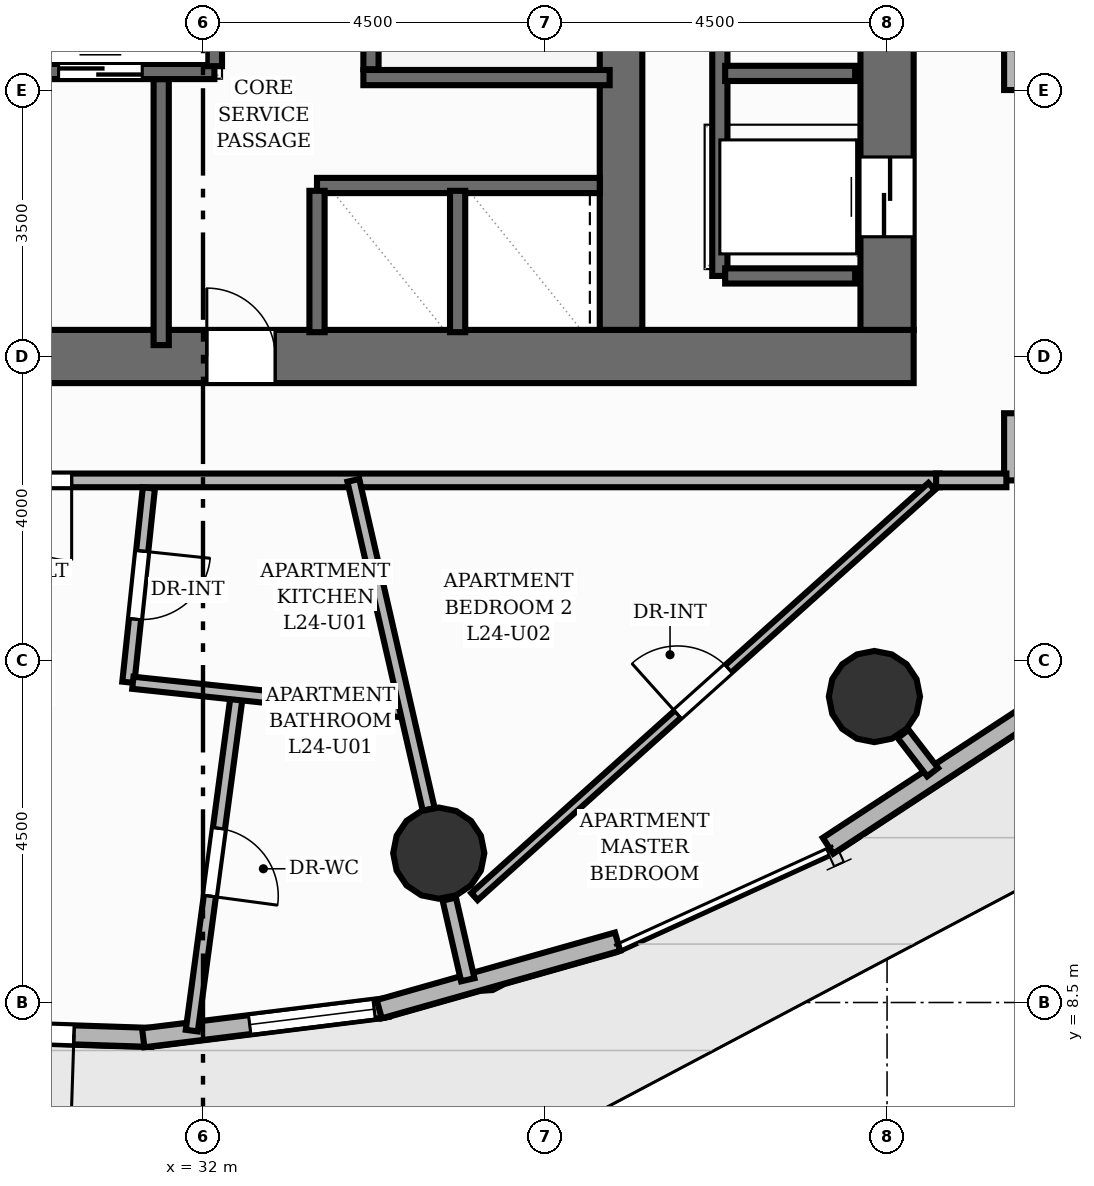
"""IFC4 building model, lengths in metres.
Left out: names, types, materials, properties, quantities, classifications, styles, units other than length and angle.
Written with IfcOpenShell. Run it as: python <this file> out.ifc"""

import sys

from ifc_helpers import new_model, si_unit, direction, frame, frame_2d, origin, origin_2d, place, context, subcontext, project, spatial, rectangle, circle, extrude, element, fill, save


model = new_model("IFC4")
c1 = context("Model", 3, precision=1e-05, world=origin(), true_north=direction((0.0, 1.0)))
c2 = subcontext(c1, "Body", "Model", "MODEL_VIEW")
j1 = project(units=[si_unit("LENGTHUNIT", "METRE"), si_unit("PLANEANGLEUNIT", "RADIAN")], contexts=[c1])
p1 = place(None, origin())
s1 = spatial("IfcSite", under=j1, at=p1, CompositionType="ELEMENT")
p2 = place(p1, origin())
s2 = spatial("IfcBuilding", under=s1, at=p2, CompositionType="ELEMENT")
p3 = place(p2, frame((0.0, 0.0, 83.68)))
s3 = spatial("IfcBuildingStorey", under=s2, at=p3, CompositionType="ELEMENT", Elevation=83.68)
p4 = place(p3, frame((22.65, 17.0, 0.0), z_axis=(0.0, 0.0, 1.0), x_axis=(1.0, 0.0, 0.0)))
e1 = element("IfcWall", 1, at=p4, inside=s3, PredefinedType="SHEAR", context=c2, shape_type="SweptSolid", body=[
    extrude(rectangle(XDim=18.7, YDim=0.7, at=frame_2d((9.35, 0.0))), origin(), (0.0, 0.0, 1.0), 3.2),
])
p5 = place(p4, frame((5.85, 0.0, 0.0)))
e2 = element("IfcOpeningElement", 2, at=p5, cuts=e1, PredefinedType="OPENING", context=c2, shape_type="SweptSolid", body=[
    extrude(rectangle(XDim=1.1, YDim=2.15, at=frame_2d((0.55, 1.075))), frame((0.0, 0.36, 0.0), z_axis=(0.0, -1.0, 0.0), x_axis=(1.0, 0.0, 0.0)), (0.0, 0.0, 1.0), 0.72),
])
p6 = place(p4, frame((9.4, 0.0, 0.0)))
e3 = element("IfcOpeningElement", 3, at=p6, cuts=e1, PredefinedType="OPENING", context=c2, shape_type="SweptSolid", body=[
    extrude(rectangle(XDim=0.9, YDim=2.1, at=frame_2d((0.45, 1.05))), frame((0.0, 0.36, 0.0), z_axis=(0.0, -1.0, 0.0), x_axis=(1.0, 0.0, 0.0)), (0.0, 0.0, 1.0), 0.72),
])
p7 = place(p3, frame((41.0, 17.35, 0.0), z_axis=(0.0, 0.0, 1.0), x_axis=(0.0, 1.0, 0.0)))
e4 = element("IfcWall", 4, at=p7, inside=s3, PredefinedType="SHEAR", context=c2, shape_type="SweptSolid", body=[
    extrude(rectangle(XDim=13.3, YDim=0.7, at=frame_2d((6.65, 0.0))), origin(), (0.0, 0.0, 1.0), 3.2),
])
p8 = place(p7, frame((1.225, 0.0, 0.0)))
e5 = element("IfcOpeningElement", 5, at=p8, cuts=e4, PredefinedType="OPENING", context=c2, shape_type="SweptSolid", body=[
    extrude(rectangle(XDim=1.05, YDim=2.15, at=frame_2d((0.525, 1.075))), frame((0.0, 0.36, 0.0), z_axis=(0.0, -1.0, 0.0), x_axis=(1.0, 0.0, 0.0)), (0.0, 0.0, 1.0), 0.72),
])
p9 = place(p7, frame((4.475, 0.0, 0.0)))
e6 = element("IfcOpeningElement", 6, at=p9, cuts=e4, PredefinedType="OPENING", context=c2, shape_type="SweptSolid", body=[
    extrude(rectangle(XDim=1.05, YDim=2.15, at=frame_2d((0.525, 1.075))), frame((0.0, 0.36, 0.0), z_axis=(0.0, -1.0, 0.0), x_axis=(1.0, 0.0, 0.0)), (0.0, 0.0, 1.0), 0.72),
])
p10 = place(p7, frame((7.775, 0.0, 0.0)))
e7 = element("IfcOpeningElement", 7, at=p10, cuts=e4, PredefinedType="OPENING", context=c2, shape_type="SweptSolid", body=[
    extrude(rectangle(XDim=1.05, YDim=2.15, at=frame_2d((0.525, 1.075))), frame((0.0, 0.36, 0.0), z_axis=(0.0, -1.0, 0.0), x_axis=(1.0, 0.0, 0.0)), (0.0, 0.0, 1.0), 0.72),
])
p11 = place(p7, frame((11.025, 0.0, 0.0)))
e8 = element("IfcOpeningElement", 8, at=p11, cuts=e4, PredefinedType="OPENING", context=c2, shape_type="SweptSolid", body=[
    extrude(rectangle(XDim=1.05, YDim=2.15, at=frame_2d((0.525, 1.075))), frame((0.0, 0.36, 0.0), z_axis=(0.0, -1.0, 0.0), x_axis=(1.0, 0.0, 0.0)), (0.0, 0.0, 1.0), 0.72),
])
p12 = place(p3, frame((37.5, 17.35, 0.0), z_axis=(0.0, 0.0, 1.0), x_axis=(0.0, 1.0, 0.0)))
e9 = element("IfcWall", 9, at=p12, inside=s3, PredefinedType="SHEAR", context=c2, shape_type="SweptSolid", body=[
    extrude(rectangle(XDim=13.3, YDim=0.56, at=frame_2d((6.65, 0.0))), origin(), (0.0, 0.0, 1.0), 3.2),
])
for number, where, z_axis, x_axis in (
    (10, (35.102, 10.465, 0.0), (0.0, 0.0, 1.0), (1.0, 0.0, 0.0)),
    (11, (40.833, 12.526, 0.0), (0.0, 0.0, 1.0), (1.0, 0.0, 0.0)),
):
    element("IfcColumn", number, at=place(p3, frame(where, z_axis=z_axis, x_axis=x_axis)), inside=s3, PredefinedType="COLUMN", context=c2, shape_type="SweptSolid", body=[
        extrude(circle(Radius=0.6, at=origin_2d()), origin(), (0.0, 0.0, 1.0), 3.2),
    ])
p13 = place(p3, frame((31.323, 8.041, 0.0), z_axis=(0.0, 0.0, 1.0), x_axis=(-0.999464092211, 0.032734208101, 0.0)))
e12 = element("IfcWall", 12, at=p13, inside=s3, PredefinedType="SOLIDWALL", context=c2, shape_type="SweptSolid", body=[
    extrude(rectangle(XDim=3.192, YDim=0.25, at=frame_2d((1.596, 0.0))), origin(), (0.0, 0.0, 1.0), 2.96),
])
p14 = place(p13, frame((1.021, 0.0, 0.0)))
e13 = element("IfcOpeningElement", 13, at=p14, cuts=e12, PredefinedType="OPENING", context=c2, shape_type="SweptSolid", body=[
    extrude(rectangle(XDim=1.15, YDim=2.2, at=frame_2d((0.575, 1.1))), frame((0.0, 0.135, 0.0), z_axis=(0.0, -1.0, 0.0), x_axis=(1.0, 0.0, 0.0)), (0.0, 0.0, 1.0), 0.27),
])
p15 = place(p3, frame((34.425, 8.434, 0.0), z_axis=(0.0, 0.0, 1.0), x_axis=(-0.99241077266, -0.122966899235, 0.0)))
e14 = element("IfcWall", 14, at=p15, inside=s3, PredefinedType="SOLIDWALL", context=c2, shape_type="SweptSolid", body=[
    extrude(rectangle(XDim=3.236, YDim=0.25, at=frame_2d((1.618, 0.0))), origin(), (0.0, 0.0, 1.0), 2.96),
])
p16 = place(p15, frame((0.175, 0.0, 0.85)))
e15 = element("IfcOpeningElement", 15, at=p16, cuts=e14, PredefinedType="OPENING", context=c2, shape_type="SweptSolid", body=[
    extrude(rectangle(XDim=1.65, YDim=1.55, at=frame_2d((0.825, 0.775))), frame((0.0, 0.135, 0.0), z_axis=(0.0, -1.0, 0.0), x_axis=(1.0, 0.0, 0.0)), (0.0, 0.0, 1.0), 0.27),
])
p17 = place(p3, frame((37.455, 9.301, 0.0), z_axis=(0.0, 0.0, 1.0), x_axis=(-0.962134911526, -0.272573681825, 0.0)))
e16 = element("IfcWall", 16, at=p17, inside=s3, PredefinedType="SOLIDWALL", context=c2, shape_type="SweptSolid", body=[
    extrude(rectangle(XDim=3.26, YDim=0.25, at=frame_2d((1.63, 0.0))), origin(), (0.0, 0.0, 1.0), 2.96),
])
p18 = place(p3, frame((42.929, 12.337, 0.0), z_axis=(0.0, 0.0, 1.0), x_axis=(-0.836273856728, -0.548311988336, 0.0)))
e17 = element("IfcWall", 17, at=p18, inside=s3, PredefinedType="SOLIDWALL", context=c2, shape_type="SweptSolid", body=[
    extrude(rectangle(XDim=3.236, YDim=0.25, at=frame_2d((1.618, 0.0))), origin(), (0.0, 0.0, 1.0), 2.96),
])
p19 = place(p3, frame((34.21, 20.78, 0.0), z_axis=(0.0, 0.0, 1.0), x_axis=(0.0, 1.0, 0.0)))
e18 = element("IfcWall", 18, at=p19, inside=s3, PredefinedType="SHEAR", context=c2, shape_type="SweptSolid", body=[
    extrude(rectangle(XDim=6.44, YDim=0.2, at=frame_2d((3.22, 0.0))), origin(), (0.0, 0.0, 1.0), 3.2),
])
p20 = place(p3, frame((34.11, 20.67, 0.0), z_axis=(0.0, 0.0, 1.0), x_axis=(1.0, 0.0, 0.0)))
e19 = element("IfcWall", 19, at=p20, inside=s3, PredefinedType="SHEAR", context=c2, shape_type="SweptSolid", body=[
    extrude(rectangle(XDim=3.24, YDim=0.2, at=frame_2d((1.62, 0.0))), origin(), (0.0, 0.0, 1.0), 3.2),
])
p21 = place(p3, frame((31.45, 17.15, 0.0), z_axis=(0.0, 0.0, 1.0), x_axis=(0.0, 1.0, 0.0)))
e20 = element("IfcWall", 20, at=p21, inside=s3, PredefinedType="SHEAR", context=c2, shape_type="SweptSolid", body=[
    extrude(rectangle(XDim=3.5, YDim=0.2, at=frame_2d((1.75, 0.0))), origin(), (0.0, 0.0, 1.0), 3.2),
])
p22 = place(p3, frame((29.85, 20.75, 0.0), z_axis=(0.0, 0.0, 1.0), x_axis=(1.0, 0.0, 0.0)))
e21 = element("IfcWall", 21, at=p22, inside=s3, PredefinedType="SHEAR", context=c2, shape_type="SweptSolid", body=[
    extrude(rectangle(XDim=2.3, YDim=0.2, at=frame_2d((1.15, 0.0))), origin(), (0.0, 0.0, 1.0), 3.2),
])
p23 = place(p22, frame((0.25, 0.0, 0.0)))
e22 = element("IfcOpeningElement", 22, at=p23, cuts=e21, PredefinedType="OPENING", context=c2, shape_type="SweptSolid", body=[
    extrude(rectangle(XDim=1.1, YDim=2.15, at=frame_2d((0.55, 1.075))), frame((0.0, 0.11, 0.0), z_axis=(0.0, -1.0, 0.0), x_axis=(1.0, 0.0, 0.0)), (0.0, 0.0, 1.0), 0.22),
])
p24 = place(p3, frame((32.15, 20.82, 0.0), z_axis=(0.0, 0.0, 1.0), x_axis=(0.0, 1.0, 0.0)))
e23 = element("IfcWall", 23, at=p24, inside=s3, PredefinedType="SHEAR", context=c2, shape_type="SweptSolid", body=[
    extrude(rectangle(XDim=1.71, YDim=0.2, at=frame_2d((0.855, 0.0))), origin(), (0.0, 0.0, 1.0), 3.2),
])
p25 = place(p3, frame((38.8, 18.06, 0.0), z_axis=(0.0, 0.0, 1.0), x_axis=(0.0, 1.0, 0.0)))
e24 = element("IfcWall", 24, at=p25, inside=s3, PredefinedType="SHEAR", context=c2, shape_type="SweptSolid", body=[
    extrude(rectangle(XDim=11.88, YDim=0.2, at=frame_2d((5.94, 0.0))), origin(), (0.0, 0.0, 1.0), 3.2),
])
for number, where, z_axis, x_axis in (
    (25, (38.87, 18.06, 0.0), (0.0, 0.0, 1.0), (1.0, 0.0, 0.0)),
    (26, (38.87, 20.725, 0.0), (0.0, 0.0, 1.0), (1.0, 0.0, 0.0)),
):
    element("IfcWall", number, at=place(p3, frame(where, z_axis=z_axis, x_axis=x_axis)), inside=s3, PredefinedType="SHEAR", context=c2, shape_type="SweptSolid", body=[
        extrude(rectangle(XDim=1.71, YDim=0.2, at=frame_2d((0.855, 0.0))), origin(), (0.0, 0.0, 1.0), 3.2),
    ])
p26 = place(p3, frame((33.5, 19.25, 0.0), z_axis=(0.0, 0.0, 1.0), x_axis=(1.0, 0.0, 0.0)))
e27 = element("IfcWall", 27, at=p26, inside=s3, PredefinedType="SHEAR", context=c2, shape_type="SweptSolid", body=[
    extrude(rectangle(XDim=3.72, YDim=0.2, at=frame_2d((1.86, 0.0))), origin(), (0.0, 0.0, 1.0), 3.2),
])
for number, where, z_axis, x_axis in (
    (28, (33.5, 17.32, 0.0), (0.0, 0.0, 1.0), (0.0, 1.0, 0.0)),
    (29, (35.35, 17.32, 0.0), (0.0, 0.0, 1.0), (0.0, 1.0, 0.0)),
):
    element("IfcWall", number, at=place(p3, frame(where, z_axis=z_axis, x_axis=x_axis)), inside=s3, PredefinedType="SHEAR", context=c2, shape_type="SweptSolid", body=[
        extrude(rectangle(XDim=1.86, YDim=0.2, at=frame_2d((0.93, 0.0))), origin(), (0.0, 0.0, 1.0), 3.2),
    ])
p27 = place(p3, frame((35.24, 9.861, 0.0), z_axis=(0.0, 0.0, 1.0), x_axis=(0.223287406217, -0.974752652843, 0.0)))
e30 = element("IfcWall", 30, at=p27, inside=s3, PredefinedType="PARTITIONING", context=c2, shape_type="SweptSolid", body=[
    extrude(rectangle(XDim=1.089, YDim=0.18, at=frame_2d((0.544, 0.0))), origin(), (0.0, 0.0, 1.0), 2.261),
])
p28 = place(p3, frame((41.212, 12.034, 0.0), z_axis=(0.0, 0.0, 1.0), x_axis=(0.609970610867, -0.792424036661, 0.0)))
e31 = element("IfcWall", 31, at=p28, inside=s3, PredefinedType="PARTITIONING", context=c2, shape_type="SweptSolid", body=[
    extrude(rectangle(XDim=0.635, YDim=0.18, at=frame_2d((0.318, 0.0))), origin(), (0.0, 0.0, 1.0), 2.261),
])
p29 = place(p3, frame((41.695, 15.37, 0.0), z_axis=(0.0, 0.0, 1.0), x_axis=(-1.0, 0.0, 0.0)))
e32 = element("IfcWall", 32, at=p29, inside=s3, PredefinedType="PARTITIONING", context=c2, shape_type="SweptSolid", body=[
    extrude(rectangle(XDim=20.325, YDim=0.18, at=frame_2d((10.163, 0.0))), origin(), (0.0, 0.0, 1.0), 2.955),
])
p30 = place(p29, frame((11.424, 0.0, 0.0)))
e33 = element("IfcOpeningElement", 33, at=p30, cuts=e32, PredefinedType="OPENING", context=c2, shape_type="SweptSolid", body=[
    extrude(rectangle(XDim=1.05, YDim=2.15, at=frame_2d((0.525, 1.075))), frame((0.0, 0.1, 0.0), z_axis=(0.0, -1.0, 0.0), x_axis=(1.0, 0.0, 0.0)), (0.0, 0.0, 1.0), 0.2),
])
p31 = place(p3, frame((42.63, 21.54, 0.0), z_axis=(0.0, 0.0, 1.0), x_axis=(0.0, -1.0, 0.0)))
e34 = element("IfcWall", 34, at=p31, inside=s3, PredefinedType="PARTITIONING", context=c2, shape_type="SweptSolid", body=[
    extrude(rectangle(XDim=1.034, YDim=0.18, at=frame_2d((0.517, 0.0))), origin(), (0.0, 0.0, 1.0), 2.955),
])
p32 = place(p3, frame((42.63, 16.253, 0.0), z_axis=(0.0, 0.0, 1.0), x_axis=(0.0, -1.0, 0.0)))
e35 = element("IfcWall", 35, at=p32, inside=s3, PredefinedType="PARTITIONING", context=c2, shape_type="SweptSolid", body=[
    extrude(rectangle(XDim=0.883, YDim=0.18, at=frame_2d((0.441, 0.0))), origin(), (0.0, 0.0, 1.0), 2.955),
])
p33 = place(p3, frame((42.57, 15.37, 0.0), z_axis=(0.0, 0.0, 1.0), x_axis=(-1.0, 0.0, 0.0)))
e36 = element("IfcWall", 36, at=p33, inside=s3, PredefinedType="PARTITIONING", context=c2, shape_type="SweptSolid", body=[
    extrude(rectangle(XDim=0.925, YDim=0.18, at=frame_2d((0.462, 0.0))), origin(), (0.0, 0.0, 1.0), 2.955),
])
p34 = place(p3, frame((32.448, 12.562, 0.0), z_axis=(0.0, 0.0, 1.0), x_axis=(-0.132986130607, -0.991117898671, 0.0)))
e37 = element("IfcWall", 37, at=p34, inside=s3, PredefinedType="PLUMBINGWALL", context=c2, shape_type="SweptSolid", body=[
    extrude(rectangle(XDim=4.472, YDim=0.16, at=frame_2d((2.236, 0.0))), origin(), (0.0, 0.0, 1.0), 2.955),
])
p35 = place(p34, frame((1.786, 0.0, 0.0)))
e38 = element("IfcOpeningElement", 38, at=p35, cuts=e37, PredefinedType="OPENING", context=c2, shape_type="SweptSolid", body=[
    extrude(rectangle(XDim=0.9, YDim=2.1, at=frame_2d((0.45, 1.05))), frame((0.0, 0.09, 0.0), z_axis=(0.0, -1.0, 0.0), x_axis=(1.0, 0.0, 0.0)), (0.0, 0.0, 1.0), 0.18),
])
p36 = place(p3, frame((31.288, 15.271, 0.0), z_axis=(0.0, 0.0, 1.0), x_axis=(-0.105094954285, -0.994462191631, 0.0)))
e39 = element("IfcWall", 39, at=p36, inside=s3, PredefinedType="PLUMBINGWALL", context=c2, shape_type="SweptSolid", body=[
    extrude(rectangle(XDim=2.572, YDim=0.16, at=frame_2d((1.286, 0.0))), origin(), (0.0, 0.0, 1.0), 2.641),
])
p37 = place(p36, frame((0.836, 0.0, 0.0)))
e40 = element("IfcOpeningElement", 40, at=p37, cuts=e39, PredefinedType="OPENING", context=c2, shape_type="SweptSolid", body=[
    extrude(rectangle(XDim=0.9, YDim=2.1, at=frame_2d((0.45, 1.05))), frame((0.0, 0.09, 0.0), z_axis=(0.0, -1.0, 0.0), x_axis=(1.0, 0.0, 0.0)), (0.0, 0.0, 1.0), 0.18),
])
p38 = place(p3, frame((31.077, 12.707, 0.0), z_axis=(0.0, 0.0, 1.0), x_axis=(0.994472124215, -0.105000924563, 0.0)))
e41 = element("IfcWall", 41, at=p38, inside=s3, PredefinedType="PLUMBINGWALL", context=c2, shape_type="SweptSolid", body=[
    extrude(rectangle(XDim=3.618, YDim=0.16, at=frame_2d((1.809, 0.0))), origin(), (0.0, 0.0, 1.0), 2.955),
])
p39 = place(p3, frame((33.978, 15.37, 0.0), z_axis=(0.0, 0.0, 1.0), x_axis=(0.223321757884, -0.974744783241, 0.0)))
e42 = element("IfcWall", 42, at=p39, inside=s3, PredefinedType="PLUMBINGWALL", context=c2, shape_type="SweptSolid", body=[
    extrude(rectangle(XDim=4.442, YDim=0.16, at=frame_2d((2.221, 0.0))), origin(), (0.0, 0.0, 1.0), 2.261),
])
p40 = place(p3, frame((35.571, 9.894, 0.0), z_axis=(0.0, 0.0, 1.0), x_axis=(0.744379363772, 0.667756963865, 0.0)))
e43 = element("IfcWall", 43, at=p40, inside=s3, PredefinedType="PARTITIONING", context=c2, shape_type="SweptSolid", body=[
    extrude(rectangle(XDim=8.08, YDim=0.125, at=frame_2d((4.04, 0.0))), origin(), (0.0, 0.0, 1.0), 2.404),
])
p41 = place(p40, frame((3.59, 0.0, 0.0)))
e44 = element("IfcOpeningElement", 44, at=p41, cuts=e43, PredefinedType="OPENING", context=c2, shape_type="SweptSolid", body=[
    extrude(rectangle(XDim=0.9, YDim=2.1, at=frame_2d((0.45, 1.05))), frame((0.0, 0.073, 0.0), z_axis=(0.0, -1.0, 0.0), x_axis=(1.0, 0.0, 0.0)), (0.0, 0.0, 1.0), 0.145),
])
p42 = place(p14, origin())
e45 = element("IfcDoor", 45, at=p42, inside=s3, OperationType="SINGLE_SWING_LEFT", PredefinedType="DOOR", context=c2, shape_type="SweptSolid", body=[
    extrude(rectangle(XDim=1.15, YDim=2.2, at=frame_2d((0.575, 1.1))), frame((0.0, 0.025, 0.0), z_axis=(0.0, -1.0, 0.0), x_axis=(1.0, 0.0, 0.0)), (0.0, 0.0, 1.0), 0.05),
])
fill(e13, e45)
p43 = place(p16, origin())
e46 = element("IfcWindow", 46, at=p43, inside=s3, PartitioningType="SINGLE_PANEL", PredefinedType="WINDOW", context=c2, shape_type="SweptSolid", body=[
    extrude(rectangle(XDim=1.65, YDim=1.55, at=frame_2d((0.825, 0.775))), frame((0.0, 0.03, 0.0), z_axis=(0.0, -1.0, 0.0), x_axis=(1.0, 0.0, 0.0)), (0.0, 0.0, 1.0), 0.06),
])
fill(e15, e46)
p44 = place(p23, origin())
e47 = element("IfcDoor", 47, at=p44, inside=s3, OperationType="DOUBLE_DOOR_SLIDING", PredefinedType="DOOR", context=c2, shape_type="SweptSolid", body=[
    extrude(rectangle(XDim=1.1, YDim=2.15, at=frame_2d((0.55, 1.075))), frame((0.0, 0.025, 0.0), z_axis=(0.0, -1.0, 0.0), x_axis=(1.0, 0.0, 0.0)), (0.0, 0.0, 1.0), 0.05),
])
fill(e22, e47)
p45 = place(p8, origin())
e48 = element("IfcDoor", 48, at=p45, inside=s3, OperationType="DOUBLE_DOOR_SLIDING", PredefinedType="DOOR", context=c2, shape_type="SweptSolid", body=[
    extrude(rectangle(XDim=1.05, YDim=2.15, at=frame_2d((0.525, 1.075))), frame((0.0, 0.025, 0.0), z_axis=(0.0, -1.0, 0.0), x_axis=(1.0, 0.0, 0.0)), (0.0, 0.0, 1.0), 0.05),
])
fill(e5, e48)
p46 = place(p6, origin())
e49 = element("IfcDoor", 49, at=p46, inside=s3, OperationType="SINGLE_SWING_LEFT", PredefinedType="DOOR", context=c2, shape_type="SweptSolid", body=[
    extrude(rectangle(XDim=0.9, YDim=2.1, at=frame_2d((0.45, 1.05))), frame((0.0, 0.025, 0.0), z_axis=(0.0, -1.0, 0.0), x_axis=(1.0, 0.0, 0.0)), (0.0, 0.0, 1.0), 0.05),
])
fill(e3, e49)
p47 = place(p30, origin())
e50 = element("IfcDoor", 50, at=p47, inside=s3, OperationType="SINGLE_SWING_LEFT", PredefinedType="DOOR", context=c2, shape_type="SweptSolid", body=[
    extrude(rectangle(XDim=1.05, YDim=2.15, at=frame_2d((0.525, 1.075))), frame((0.0, 0.025, 0.0), z_axis=(0.0, -1.0, 0.0), x_axis=(1.0, 0.0, 0.0)), (0.0, 0.0, 1.0), 0.05),
])
fill(e33, e50)
p48 = place(p35, origin())
e51 = element("IfcDoor", 51, at=p48, inside=s3, OperationType="SINGLE_SWING_RIGHT", PredefinedType="DOOR", context=c2, shape_type="SweptSolid", body=[
    extrude(rectangle(XDim=0.9, YDim=2.1, at=frame_2d((0.45, 1.05))), frame((0.0, 0.025, 0.0), z_axis=(0.0, -1.0, 0.0), x_axis=(1.0, 0.0, 0.0)), (0.0, 0.0, 1.0), 0.05),
])
fill(e38, e51)
p49 = place(p37, origin())
e52 = element("IfcDoor", 52, at=p49, inside=s3, OperationType="SINGLE_SWING_LEFT", PredefinedType="DOOR", context=c2, shape_type="SweptSolid", body=[
    extrude(rectangle(XDim=0.9, YDim=2.1, at=frame_2d((0.45, 1.05))), frame((0.0, 0.025, 0.0), z_axis=(0.0, -1.0, 0.0), x_axis=(1.0, 0.0, 0.0)), (0.0, 0.0, 1.0), 0.05),
])
fill(e40, e52)
p50 = place(p41, origin())
e53 = element("IfcDoor", 53, at=p50, inside=s3, OperationType="SINGLE_SWING_LEFT", PredefinedType="DOOR", context=c2, shape_type="SweptSolid", body=[
    extrude(rectangle(XDim=0.9, YDim=2.1, at=frame_2d((0.45, 1.05))), frame((0.0, 0.025, 0.0), z_axis=(0.0, -1.0, 0.0), x_axis=(1.0, 0.0, 0.0)), (0.0, 0.0, 1.0), 0.05),
])
fill(e44, e53)
save(model, sys.argv[1])
